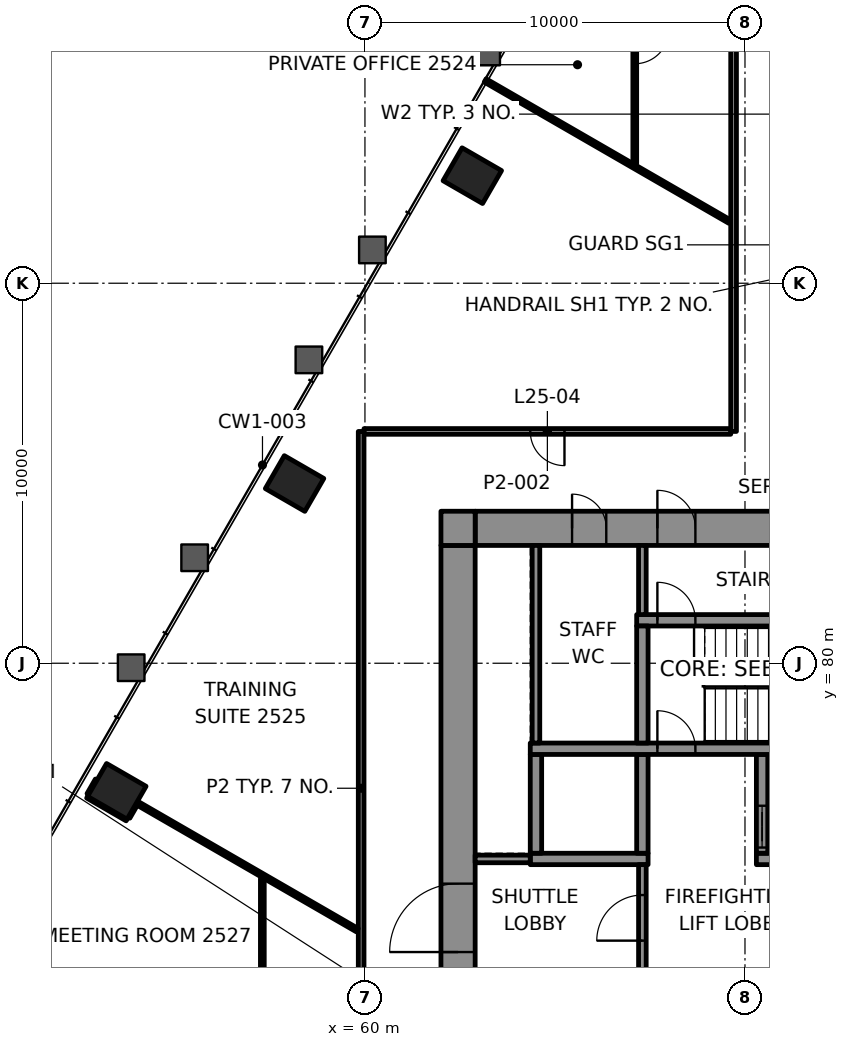
"""IFC4 building model, lengths in metres.
Left out: names, types, materials, properties, quantities, classifications, styles, units other than length and angle.
Written with IfcOpenShell. Run it as: python <this file> out.ifc"""

import sys

from ifc_helpers import new_model, si_unit, direction, frame, frame_2d, origin, origin_2d, place, context, subcontext, project, spatial, rectangle, extrude, element, fill, save


model = new_model("IFC4")
c1 = context("Model", 3, precision=1e-05, world=origin(), true_north=direction((0.0, 1.0)))
c2 = subcontext(c1, "Body", "Model", "MODEL_VIEW")
j1 = project(units=[si_unit("LENGTHUNIT", "METRE"), si_unit("PLANEANGLEUNIT", "RADIAN")], contexts=[c1])
p1 = place(None, origin())
s1 = spatial("IfcSite", under=j1, at=p1, CompositionType="ELEMENT")
p2 = place(p1, origin())
s2 = spatial("IfcBuilding", under=s1, at=p2, CompositionType="ELEMENT")
p3 = place(p2, frame((0.0, 0.0, 111.4)))
s3 = spatial("IfcBuildingStorey", under=s2, at=p3, CompositionType="ELEMENT", Elevation=111.4)
for number, where, z_axis, x_axis in (
    (1, (62.825, 92.83, -0.0), (0.0, 0.0, 1.0), (-0.5, -0.866, 0.0)),
    (2, (58.148, 84.729, -0.0), (0.0, 0.0, 1.0), (-0.5, -0.866, 0.0)),
    (3, (53.471, 76.628, -0.0), (0.0, 0.0, 1.0), (-0.5, -0.866, 0.0)),
):
    element("IfcColumn", number, at=place(p3, frame(where, z_axis=z_axis, x_axis=x_axis)), inside=s3, PredefinedType="COLUMN", context=c2, shape_type="SweptSolid", body=[
        extrude(rectangle(XDim=1.0, YDim=1.2, at=origin_2d()), origin(), (0.0, 0.0, 1.0), 4.2),
    ])
p4 = place(p3, frame((62.9, 83.55, 0.0), z_axis=(0.0, 0.0, 1.0), x_axis=(1.0, 0.0, 0.0)))
e4 = element("IfcWall", 4, at=p4, inside=s3, PredefinedType="SHEAR", context=c2, shape_type="SweptSolid", body=[
    extrude(rectangle(XDim=25.1, YDim=0.9, at=frame_2d((12.55, 0.0))), origin(), (0.0, 0.0, 1.0), 4.0),
])
p5 = place(p4, frame((4.795, 0.0, 0.0)))
e5 = element("IfcOpeningElement", 5, at=p5, cuts=e4, PredefinedType="OPENING", context=c2, shape_type="SweptSolid", body=[
    extrude(rectangle(XDim=1.0, YDim=2.1, at=frame_2d((0.5, 1.05))), frame((0.0, 0.46, 0.0), z_axis=(0.0, -1.0, 0.0), x_axis=(1.0, 0.0, 0.0)), (0.0, 0.0, 1.0), 0.92),
])
p6 = place(p4, frame((18.605, 0.0, 0.0)))
e6 = element("IfcOpeningElement", 6, at=p6, cuts=e4, PredefinedType="OPENING", context=c2, shape_type="SweptSolid", body=[
    extrude(rectangle(XDim=1.0, YDim=2.1, at=frame_2d((0.5, 1.05))), frame((0.0, 0.46, 0.0), z_axis=(0.0, -1.0, 0.0), x_axis=(1.0, 0.0, 0.0)), (0.0, 0.0, 1.0), 0.92),
])
p7 = place(p4, frame((2.55, 0.0, 0.0)))
e7 = element("IfcOpeningElement", 7, at=p7, cuts=e4, PredefinedType="OPENING", context=c2, shape_type="SweptSolid", body=[
    extrude(rectangle(XDim=0.9, YDim=2.1, at=frame_2d((0.45, 1.05))), frame((0.0, 0.46, 0.0), z_axis=(0.0, -1.0, 0.0), x_axis=(1.0, 0.0, 0.0)), (0.0, 0.0, 1.0), 0.92),
])
p8 = place(p4, frame((11.75, 0.0, 0.0)))
e8 = element("IfcOpeningElement", 8, at=p8, cuts=e4, PredefinedType="OPENING", context=c2, shape_type="SweptSolid", body=[
    extrude(rectangle(XDim=0.9, YDim=2.1, at=frame_2d((0.45, 1.05))), frame((0.0, 0.46, 0.0), z_axis=(0.0, -1.0, 0.0), x_axis=(1.0, 0.0, 0.0)), (0.0, 0.0, 1.0), 0.92),
])
p9 = place(p4, frame((21.65, 0.0, 0.0)))
e9 = element("IfcOpeningElement", 9, at=p9, cuts=e4, PredefinedType="OPENING", context=c2, shape_type="SweptSolid", body=[
    extrude(rectangle(XDim=0.9, YDim=2.1, at=frame_2d((0.45, 1.05))), frame((0.0, 0.46, 0.0), z_axis=(0.0, -1.0, 0.0), x_axis=(1.0, 0.0, 0.0)), (0.0, 0.0, 1.0), 0.92),
])
p10 = place(p3, frame((62.45, 66.9, 0.0), z_axis=(0.0, 0.0, 1.0), x_axis=(0.0, 1.0, 0.0)))
e10 = element("IfcWall", 10, at=p10, inside=s3, PredefinedType="SHEAR", context=c2, shape_type="SweptSolid", body=[
    extrude(rectangle(XDim=16.2, YDim=0.9, at=frame_2d((8.1, 0.0))), origin(), (0.0, 0.0, 1.0), 4.0),
])
p11 = place(p10, frame((5.5, 0.0, 0.0)))
e11 = element("IfcOpeningElement", 11, at=p11, cuts=e10, PredefinedType="OPENING", context=c2, shape_type="SweptSolid", body=[
    extrude(rectangle(XDim=1.8, YDim=2.1, at=frame_2d((0.9, 1.05))), frame((0.0, 0.46, 0.0), z_axis=(0.0, -1.0, 0.0), x_axis=(1.0, 0.0, 0.0)), (0.0, 0.0, 1.0), 0.92),
])
p12 = place(p3, frame((64.35, 74.85, 0.0), z_axis=(0.0, 0.0, 1.0), x_axis=(1.0, 0.0, 0.0)))
e12 = element("IfcWall", 12, at=p12, inside=s3, PredefinedType="SHEAR", context=c2, shape_type="SweptSolid", body=[
    extrude(rectangle(XDim=3.1, YDim=0.3, at=frame_2d((1.55, 0.0))), origin(), (0.0, 0.0, 1.0), 4.0),
])
p13 = place(p3, frame((70.3, 74.85, 0.0), z_axis=(0.0, 0.0, 1.0), x_axis=(1.0, 0.0, 0.0)))
e13 = element("IfcWall", 13, at=p13, inside=s3, PredefinedType="SHEAR", context=c2, shape_type="SweptSolid", body=[
    extrude(rectangle(XDim=16.8, YDim=0.3, at=frame_2d((8.4, 0.0))), origin(), (0.0, 0.0, 1.0), 4.0),
])
p14 = place(p13, frame((3.8, 0.0, 0.0)))
e14 = element("IfcOpeningElement", 14, at=p14, cuts=e13, PredefinedType="OPENING", context=c2, shape_type="SweptSolid", body=[
    extrude(rectangle(XDim=1.1, YDim=2.1, at=frame_2d((0.55, 1.05))), frame((0.0, 0.16, 0.0), z_axis=(0.0, -1.0, 0.0), x_axis=(1.0, 0.0, 0.0)), (0.0, 0.0, 1.0), 0.32),
])
p15 = place(p13, frame((12.2, 0.0, 0.0)))
e15 = element("IfcOpeningElement", 15, at=p15, cuts=e13, PredefinedType="OPENING", context=c2, shape_type="SweptSolid", body=[
    extrude(rectangle(XDim=1.1, YDim=2.1, at=frame_2d((0.55, 1.05))), frame((0.0, 0.16, 0.0), z_axis=(0.0, -1.0, 0.0), x_axis=(1.0, 0.0, 0.0)), (0.0, 0.0, 1.0), 0.32),
])
p16 = place(p13, frame((14.925, 0.0, 0.0)))
e16 = element("IfcOpeningElement", 16, at=p16, cuts=e13, PredefinedType="OPENING", context=c2, shape_type="SweptSolid", body=[
    extrude(rectangle(XDim=1.1, YDim=2.1, at=frame_2d((0.55, 1.05))), frame((0.0, 0.16, 0.0), z_axis=(0.0, -1.0, 0.0), x_axis=(1.0, 0.0, 0.0)), (0.0, 0.0, 1.0), 0.32),
])
for number, where, z_axis, x_axis in (
    (17, (64.5, 75.0, 0.0), (0.0, 0.0, 1.0), (0.0, 1.0, 0.0)),
    (18, (67.3, 75.0, 0.0), (0.0, 0.0, 1.0), (0.0, 1.0, 0.0)),
):
    element("IfcWall", number, at=place(p3, frame(where, z_axis=z_axis, x_axis=x_axis)), inside=s3, PredefinedType="SHEAR", context=c2, shape_type="SweptSolid", body=[
        extrude(rectangle(XDim=2.6, YDim=0.3, at=frame_2d((1.3, 0.0))), origin(), (0.0, 0.0, 1.0), 4.0),
    ])
p17 = place(p3, frame((70.45, 75.0, 0.0), z_axis=(0.0, 0.0, 1.0), x_axis=(0.0, 1.0, 0.0)))
e19 = element("IfcWall", 19, at=p17, inside=s3, PredefinedType="SHEAR", context=c2, shape_type="SweptSolid", body=[
    extrude(rectangle(XDim=2.6, YDim=0.3, at=frame_2d((1.3, 0.0))), origin(), (0.0, 0.0, 1.0), 4.0),
])
p18 = place(p17, frame((0.15, 0.0, 0.0)))
e20 = element("IfcOpeningElement", 20, at=p18, cuts=e19, PredefinedType="OPENING", context=c2, shape_type="SweptSolid", body=[
    extrude(rectangle(XDim=1.1, YDim=2.1, at=frame_2d((0.55, 1.05))), frame((0.0, 0.16, 0.0), z_axis=(0.0, -1.0, 0.0), x_axis=(1.0, 0.0, 0.0)), (0.0, 0.0, 1.0), 0.32),
])
p19 = place(p3, frame((64.35, 77.75, 0.0), z_axis=(0.0, 0.0, 1.0), x_axis=(1.0, 0.0, 0.0)))
e21 = element("IfcWall", 21, at=p19, inside=s3, PredefinedType="SHEAR", context=c2, shape_type="SweptSolid", body=[
    extrude(rectangle(XDim=22.75, YDim=0.3, at=frame_2d((11.375, 0.0))), origin(), (0.0, 0.0, 1.0), 4.0),
])
p20 = place(p19, frame((3.345, 0.0, 0.0)))
e22 = element("IfcOpeningElement", 22, at=p20, cuts=e21, PredefinedType="OPENING", context=c2, shape_type="SweptSolid", body=[
    extrude(rectangle(XDim=1.0, YDim=2.1, at=frame_2d((0.5, 1.05))), frame((0.0, 0.16, 0.0), z_axis=(0.0, -1.0, 0.0), x_axis=(1.0, 0.0, 0.0)), (0.0, 0.0, 1.0), 0.32),
])
p21 = place(p3, frame((67.15, 81.13, 0.0), z_axis=(0.0, 0.0, 1.0), x_axis=(1.0, 0.0, 0.0)))
e23 = element("IfcWall", 23, at=p21, inside=s3, PredefinedType="SHEAR", context=c2, shape_type="SweptSolid", body=[
    extrude(rectangle(XDim=6.91, YDim=0.3, at=frame_2d((3.455, 0.0))), origin(), (0.0, 0.0, 1.0), 4.0),
])
p22 = place(p21, frame((0.545, 0.0, 0.0)))
e24 = element("IfcOpeningElement", 24, at=p22, cuts=e23, PredefinedType="OPENING", context=c2, shape_type="SweptSolid", body=[
    extrude(rectangle(XDim=1.0, YDim=2.1, at=frame_2d((0.5, 1.05))), frame((0.0, 0.16, 0.0), z_axis=(0.0, -1.0, 0.0), x_axis=(1.0, 0.0, 0.0)), (0.0, 0.0, 1.0), 0.32),
])
p23 = place(p3, frame((67.3, 77.9, 0.0), z_axis=(0.0, 0.0, 1.0), x_axis=(0.0, 1.0, 0.0)))
e25 = element("IfcWall", 25, at=p23, inside=s3, PredefinedType="SHEAR", context=c2, shape_type="SweptSolid", body=[
    extrude(rectangle(XDim=3.08, YDim=0.3, at=frame_2d((1.54, 0.0))), origin(), (0.0, 0.0, 1.0), 4.0),
])
p24 = place(p3, frame((62.0, 83.55, 0.0), z_axis=(0.0, 0.0, 1.0), x_axis=(1.0, 0.0, 0.0)))
e26 = element("IfcWall", 26, at=p24, inside=s3, PredefinedType="SHEAR", context=c2, shape_type="SweptSolid", body=[
    extrude(rectangle(XDim=0.9, YDim=0.9, at=frame_2d((0.45, 0.0))), origin(), (0.0, 0.0, 1.0), 4.0),
])
p25 = place(p3, frame((69.625, 86.1, 0.0), z_axis=(0.0, 0.0, 1.0), x_axis=(-1.0, 0.0, 0.0)))
e27 = element("IfcWall", 27, at=p25, inside=s3, PredefinedType="PARTITIONING", context=c2, shape_type="SweptSolid", body=[
    extrude(rectangle(XDim=9.649, YDim=0.15, at=frame_2d((4.825, 0.0))), origin(), (0.0, 0.0, 1.0), 3.4),
])
p26 = place(p25, frame((4.375, 0.0, 0.0)))
e28 = element("IfcOpeningElement", 28, at=p26, cuts=e27, PredefinedType="OPENING", context=c2, shape_type="SweptSolid", body=[
    extrude(rectangle(XDim=0.9, YDim=2.1, at=frame_2d((0.45, 1.05))), frame((0.0, 0.085, 0.0), z_axis=(0.0, -1.0, 0.0), x_axis=(1.0, 0.0, 0.0)), (0.0, 0.0, 1.0), 0.17),
])
p27 = place(p3, frame((53.771, 75.948, 0.0), z_axis=(0.0, 0.0, 1.0), x_axis=(0.500246304613, 0.865883153041, 0.0)))
e29 = element("IfcWall", 29, at=p27, inside=s3, PredefinedType="PARTITIONING", context=c2, shape_type="SweptSolid", body=[
    extrude(rectangle(XDim=0.39, YDim=0.1, at=frame_2d((0.195, 0.0))), origin(), (0.0, 0.0, 1.0), 3.4),
])
p28 = place(p3, frame((52.73, 76.545, 0.0), z_axis=(0.0, 0.0, 1.0), x_axis=(0.49999285859, 0.86602952684, 0.0)))
e30 = element("IfcWall", 30, at=p28, inside=s3, PredefinedType="PARTITIONING", context=c2, shape_type="SweptSolid", body=[
    extrude(rectangle(XDim=0.443, YDim=0.1, at=frame_2d((0.221, 0.0))), origin(), (0.0, 0.0, 1.0), 3.4),
])
p29 = place(p3, frame((69.7, 86.1, 0.0), z_axis=(0.0, 0.0, 1.0), x_axis=(0.0, 1.0, 0.0)))
e31 = element("IfcWall", 31, at=p29, inside=s3, PredefinedType="PARTITIONING", context=c2, shape_type="SweptSolid", body=[
    extrude(rectangle(XDim=10.599, YDim=0.15, at=frame_2d((5.3, 0.0))), origin(), (0.0, 0.0, 1.0), 3.322),
])
p30 = place(p3, frame((67.1, 99.3, 0.0), z_axis=(0.0, 0.0, 1.0), x_axis=(0.0, -1.0, 0.0)))
e32 = element("IfcWall", 32, at=p30, inside=s3, PredefinedType="PARTITIONING", context=c2, shape_type="SweptSolid", body=[
    extrude(rectangle(XDim=6.15, YDim=0.1, at=frame_2d((3.075, 0.0))), origin(), (0.0, 0.0, 1.0), 3.4),
])
p31 = place(p30, frame((2.625, 0.0, 0.0)))
e33 = element("IfcOpeningElement", 33, at=p31, cuts=e32, PredefinedType="OPENING", context=c2, shape_type="SweptSolid", body=[
    extrude(rectangle(XDim=0.9, YDim=2.1, at=frame_2d((0.45, 1.05))), frame((0.0, 0.06, 0.0), z_axis=(0.0, -1.0, 0.0), x_axis=(1.0, 0.0, 0.0)), (0.0, 0.0, 1.0), 0.12),
])
p32 = place(p3, frame((59.9, 67.321, 0.0), z_axis=(0.0, 0.0, 1.0), x_axis=(0.0, 1.0, 0.0)))
e34 = element("IfcWall", 34, at=p32, inside=s3, PredefinedType="PARTITIONING", context=c2, shape_type="SweptSolid", body=[
    extrude(rectangle(XDim=18.778, YDim=0.15, at=frame_2d((9.389, 0.0))), origin(), (0.0, 0.0, 1.0), 3.4),
])
p33 = place(p3, frame((57.3, 68.88, 0.0), z_axis=(0.0, 0.0, 1.0), x_axis=(0.0, 1.0, 0.0)))
e35 = element("IfcWall", 35, at=p33, inside=s3, PredefinedType="PARTITIONING", context=c2, shape_type="SweptSolid", body=[
    extrude(rectangle(XDim=5.45, YDim=0.1, at=frame_2d((2.725, 0.0))), origin(), (0.0, 0.0, 1.0), 3.4),
])
p34 = place(p3, frame((69.599, 91.62, 0.0), z_axis=(0.0, 0.0, 1.0), x_axis=(-0.866018724091, 0.500011569389, 0.0)))
e36 = element("IfcWall", 36, at=p34, inside=s3, PredefinedType="PARTITIONING", context=c2, shape_type="SweptSolid", body=[
    extrude(rectangle(XDim=7.431, YDim=0.1, at=frame_2d((3.716, 0.0))), origin(), (0.0, 0.0, 1.0), 3.165),
])
p35 = place(p3, frame((59.799, 72.975, 0.0), z_axis=(0.0, 0.0, 1.0), x_axis=(-0.866037071789, 0.499979789879, 0.0)))
e37 = element("IfcWall", 37, at=p35, inside=s3, PredefinedType="PARTITIONING", context=c2, shape_type="SweptSolid", body=[
    extrude(rectangle(XDim=6.707, YDim=0.1, at=frame_2d((3.354, 0.0))), origin(), (0.0, 0.0, 1.0), 3.4),
])
p36 = place(p3, frame((53.741, 75.896, 0.0), z_axis=(0.0, 0.0, 1.0), x_axis=(-0.866094119867, 0.499880961361, 0.0)))
e38 = element("IfcWall", 38, at=p36, inside=s3, PredefinedType="PARTITIONING", context=c2, shape_type="SweptSolid", body=[
    extrude(rectangle(XDim=1.2, YDim=0.1, at=frame_2d((0.6, 0.0))), origin(), (0.0, 0.0, 1.0), 3.165),
])
p37 = place(p3, frame((56.223, 68.288, 0.0), z_axis=(0.0, 0.0, 1.0), x_axis=(-0.866018922649, 0.500011225488, 0.0)))
e39 = element("IfcWall", 39, at=p37, inside=s3, PredefinedType="PARTITIONING", context=c2, shape_type="SweptSolid", body=[
    extrude(rectangle(XDim=7.513, YDim=0.1, at=frame_2d((3.757, 0.0))), origin(), (0.0, 0.0, 1.0), 3.165),
])
p38 = place(p3, frame((62.9, 74.85, 0.0), z_axis=(0.0, 0.0, 1.0), x_axis=(1.0, 0.0, 0.0)))
e40 = element("IfcWall", 40, at=p38, inside=s3, PredefinedType="PARTITIONING", context=c2, shape_type="SweptSolid", body=[
    extrude(rectangle(XDim=1.45, YDim=0.2, at=frame_2d((0.725, 0.0))), origin(), (0.0, 0.0, 1.0), 4.0),
])
p39 = place(p3, frame((64.5, 77.9, 0.0), z_axis=(0.0, 0.0, 1.0), x_axis=(0.0, 1.0, 0.0)))
e41 = element("IfcWall", 41, at=p39, inside=s3, PredefinedType="PARTITIONING", context=c2, shape_type="SweptSolid", body=[
    extrude(rectangle(XDim=5.2, YDim=0.2, at=frame_2d((2.6, 0.0))), origin(), (0.0, 0.0, 1.0), 4.0),
])
p40 = place(p3, frame((67.3, 71.9, 0.0), z_axis=(0.0, 0.0, 1.0), x_axis=(0.0, 1.0, 0.0)))
e42 = element("IfcWall", 42, at=p40, inside=s3, PredefinedType="PARTITIONING", context=c2, shape_type="SweptSolid", body=[
    extrude(rectangle(XDim=2.8, YDim=0.2, at=frame_2d((1.4, 0.0))), origin(), (0.0, 0.0, 1.0), 4.0),
])
p41 = place(p40, frame((0.8, 0.0, 0.0)))
e43 = element("IfcOpeningElement", 43, at=p41, cuts=e42, PredefinedType="OPENING", context=c2, shape_type="SweptSolid", body=[
    extrude(rectangle(XDim=1.2, YDim=2.1, at=frame_2d((0.6, 1.05))), frame((0.0, 0.11, 0.0), z_axis=(0.0, -1.0, 0.0), x_axis=(1.0, 0.0, 0.0)), (0.0, 0.0, 1.0), 0.22),
])
p42 = place(p3, frame((67.3, 81.28, 0.0), z_axis=(0.0, 0.0, 1.0), x_axis=(0.0, 1.0, 0.0)))
e44 = element("IfcWall", 44, at=p42, inside=s3, PredefinedType="PARTITIONING", context=c2, shape_type="SweptSolid", body=[
    extrude(rectangle(XDim=1.82, YDim=0.2, at=frame_2d((0.91, 0.0))), origin(), (0.0, 0.0, 1.0), 4.0),
])
p43 = place(p26, origin())
e45 = element("IfcDoor", 45, at=p43, inside=s3, OperationType="SINGLE_SWING_LEFT", PredefinedType="DOOR", context=c2, shape_type="SweptSolid", body=[
    extrude(rectangle(XDim=0.9, YDim=2.1, at=frame_2d((0.45, 1.05))), frame((0.0, 0.025, 0.0), z_axis=(0.0, -1.0, 0.0), x_axis=(1.0, 0.0, 0.0)), (0.0, 0.0, 1.0), 0.05),
])
fill(e28, e45)
p44 = place(p31, origin())
e46 = element("IfcDoor", 46, at=p44, inside=s3, OperationType="SINGLE_SWING_RIGHT", PredefinedType="DOOR", context=c2, shape_type="SweptSolid", body=[
    extrude(rectangle(XDim=0.9, YDim=2.1, at=frame_2d((0.45, 1.05))), frame((0.0, 0.025, 0.0), z_axis=(0.0, -1.0, 0.0), x_axis=(1.0, 0.0, 0.0)), (0.0, 0.0, 1.0), 0.05),
])
fill(e33, e46)
p45 = place(p18, origin())
e47 = element("IfcDoor", 47, at=p45, inside=s3, OperationType="DOUBLE_DOOR_SLIDING", PredefinedType="DOOR", context=c2, shape_type="SweptSolid", body=[
    extrude(rectangle(XDim=1.1, YDim=2.1, at=frame_2d((0.55, 1.05))), frame((0.0, 0.025, 0.0), z_axis=(0.0, -1.0, 0.0), x_axis=(1.0, 0.0, 0.0)), (0.0, 0.0, 1.0), 0.05),
])
fill(e20, e47)
p46 = place(p20, origin())
e48 = element("IfcDoor", 48, at=p46, inside=s3, OperationType="SINGLE_SWING_LEFT", PredefinedType="DOOR", context=c2, shape_type="SweptSolid", body=[
    extrude(rectangle(XDim=1.0, YDim=2.1, at=frame_2d((0.5, 1.05))), frame((0.0, 0.025, 0.0), z_axis=(0.0, -1.0, 0.0), x_axis=(1.0, 0.0, 0.0)), (0.0, 0.0, 1.0), 0.05),
])
fill(e22, e48)
p47 = place(p22, origin())
e49 = element("IfcDoor", 49, at=p47, inside=s3, OperationType="SINGLE_SWING_RIGHT", PredefinedType="DOOR", context=c2, shape_type="SweptSolid", body=[
    extrude(rectangle(XDim=1.0, YDim=2.1, at=frame_2d((0.5, 1.05))), frame((0.0, 0.025, 0.0), z_axis=(0.0, -1.0, 0.0), x_axis=(1.0, 0.0, 0.0)), (0.0, 0.0, 1.0), 0.05),
])
fill(e24, e49)
p48 = place(p5, origin())
e50 = element("IfcDoor", 50, at=p48, inside=s3, OperationType="SINGLE_SWING_LEFT", PredefinedType="DOOR", context=c2, shape_type="SweptSolid", body=[
    extrude(rectangle(XDim=1.0, YDim=2.1, at=frame_2d((0.5, 1.05))), frame((0.0, 0.17, 0.0), z_axis=(0.0, -1.0, 0.0), x_axis=(1.0, 0.0, 0.0)), (0.0, 0.0, 1.0), 0.34),
])
fill(e5, e50)
p49 = place(p41, origin())
e51 = element("IfcDoor", 51, at=p49, inside=s3, OperationType="SINGLE_SWING_RIGHT", PredefinedType="DOOR", context=c2, shape_type="SweptSolid", body=[
    extrude(rectangle(XDim=1.2, YDim=2.1, at=frame_2d((0.6, 1.05))), frame((0.0, 0.025, 0.0), z_axis=(0.0, -1.0, 0.0), x_axis=(1.0, 0.0, 0.0)), (0.0, 0.0, 1.0), 0.05),
])
fill(e43, e51)
p50 = place(p11, origin())
e52 = element("IfcDoor", 52, at=p50, inside=s3, OperationType="SINGLE_SWING_LEFT", PredefinedType="DOOR", context=c2, shape_type="SweptSolid", body=[
    extrude(rectangle(XDim=1.8, YDim=2.1, at=frame_2d((0.9, 1.05))), frame((0.0, 0.17, 0.0), z_axis=(0.0, -1.0, 0.0), x_axis=(1.0, 0.0, 0.0)), (0.0, 0.0, 1.0), 0.34),
])
fill(e11, e52)
p51 = place(p7, origin())
e53 = element("IfcDoor", 53, at=p51, inside=s3, OperationType="SINGLE_SWING_RIGHT", PredefinedType="DOOR", context=c2, shape_type="SweptSolid", body=[
    extrude(rectangle(XDim=0.9, YDim=2.1, at=frame_2d((0.45, 1.05))), frame((0.0, 0.17, 0.0), z_axis=(0.0, -1.0, 0.0), x_axis=(1.0, 0.0, 0.0)), (0.0, 0.0, 1.0), 0.34),
])
fill(e7, e53)
save(model, sys.argv[1])
